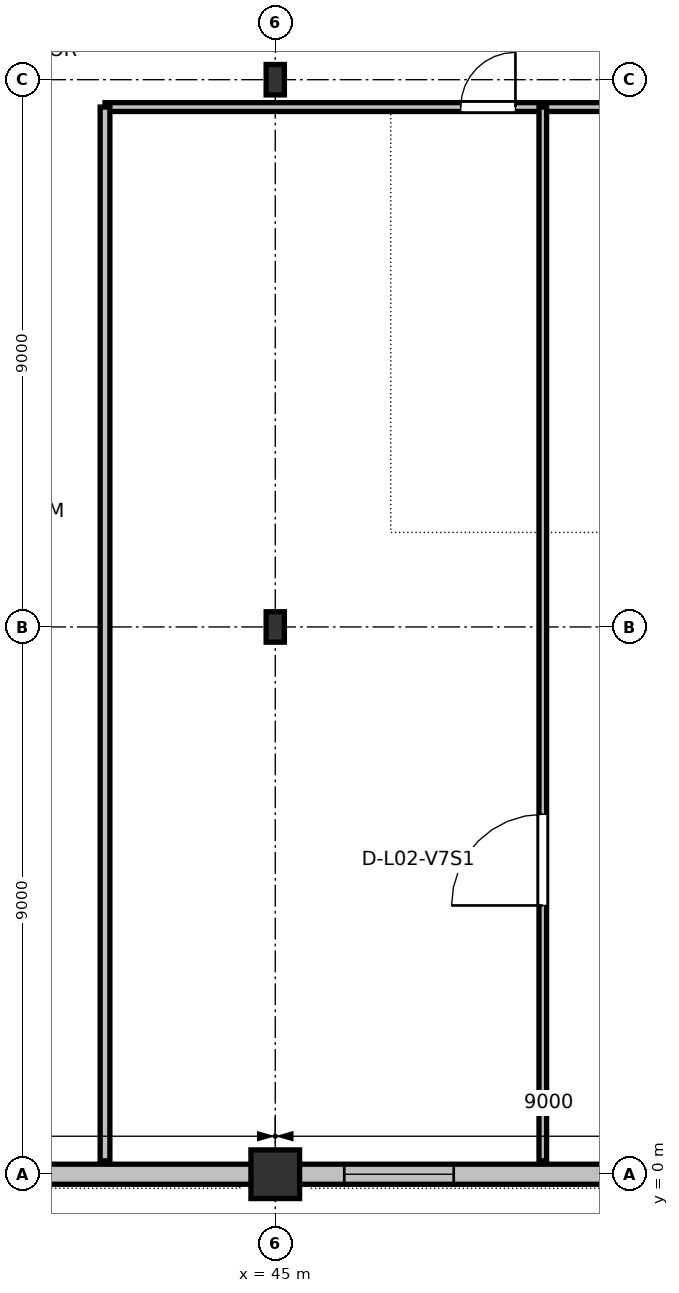
"""IFC4 building model, lengths in metres.
Left out: names, types, materials, properties, quantities, classifications, styles, units other than length and angle.
Written with IfcOpenShell. Run it as: python <this file> out.ifc"""

import sys

from ifc_helpers import new_model, si_unit, direction, frame, frame_2d, origin, origin_2d, place, context, subcontext, project, spatial, rectangle, i_section, extrude, element, fill, save


model = new_model("IFC4")
c1 = context("Model", 3, precision=1e-05, world=origin(), true_north=direction((0.0, 1.0)))
c2 = subcontext(c1, "Body", "Model", "MODEL_VIEW")
j1 = project(units=[si_unit("LENGTHUNIT", "METRE"), si_unit("PLANEANGLEUNIT", "RADIAN")], contexts=[c1])
p1 = place(None, origin())
s1 = spatial("IfcSite", under=j1, at=p1, CompositionType="ELEMENT")
p2 = place(p1, origin())
s2 = spatial("IfcBuilding", under=s1, at=p2, CompositionType="ELEMENT")
p3 = place(p2, frame((0.0, 0.0, 10.2)))
s3 = spatial("IfcBuildingStorey", under=s2, at=p3, CompositionType="ELEMENT", Elevation=10.2)
p4 = place(p3, frame((45.0, 0.0, 0.0), z_axis=(0.0, 0.0, 1.0), x_axis=(1.0, 0.0, 0.0)))
e1 = element("IfcColumn", 1, at=p4, inside=s3, PredefinedType="COLUMN", context=c2, shape_type="SweptSolid", body=[
    extrude(rectangle(XDim=0.8, YDim=0.8, at=origin_2d()), origin(), (0.0, 0.0, 1.0), 4.8),
])
for number, where, z_axis, x_axis in (
    (2, (45.0, 9.0, 0.0), (0.0, 0.0, 1.0), (1.0, 0.0, 0.0)),
    (3, (45.0, 18.0, 0.0), (0.0, 0.0, 1.0), (1.0, 0.0, 0.0)),
):
    element("IfcColumn", number, at=place(p3, frame(where, z_axis=z_axis, x_axis=x_axis)), inside=s3, PredefinedType="COLUMN", context=c2, shape_type="SweptSolid", body=[
        extrude(i_section(OverallWidth=0.3, OverallDepth=0.5, WebThickness=0.014, FlangeThickness=0.028, at=origin_2d()), origin(), (0.0, 0.0, 1.0), 4.8),
    ])
p5 = place(p3, frame((36.385, 0.0, 0.0), z_axis=(0.0, 0.0, 1.0), x_axis=(1.0, 0.0, 0.0)))
e4 = element("IfcWall", 4, at=p5, inside=s3, PredefinedType="STANDARD", context=c2, shape_type="SweptSolid", body=[
    extrude(rectangle(XDim=8.23, YDim=0.33, at=frame_2d((4.115, 0.0))), origin(), (0.0, 0.0, 1.0), 4.235),
])
p6 = place(p5, frame((0.75, 0.0, 0.9)))
e5 = element("IfcOpeningElement", 5, at=p6, cuts=e4, PredefinedType="OPENING", context=c2, shape_type="SweptSolid", body=[
    extrude(rectangle(XDim=1.0, YDim=1.35, at=frame_2d((0.5, 0.675))), frame((0.0, 0.175, 0.0), z_axis=(0.0, -1.0, 0.0), x_axis=(1.0, 0.0, 0.0)), (0.0, 0.0, 1.0), 0.35),
])
p7 = place(p3, frame((45.385, 0.0, 0.0), z_axis=(0.0, 0.0, 1.0), x_axis=(1.0, 0.0, 0.0)))
e6 = element("IfcWall", 6, at=p7, inside=s3, PredefinedType="STANDARD", context=c2, shape_type="SweptSolid", body=[
    extrude(rectangle(XDim=8.23, YDim=0.33, at=frame_2d((4.115, 0.0))), origin(), (0.0, 0.0, 1.0), 4.235),
])
p8 = place(p7, frame((0.75, 0.0, 0.9)))
e7 = element("IfcOpeningElement", 7, at=p8, cuts=e6, PredefinedType="OPENING", context=c2, shape_type="SweptSolid", body=[
    extrude(rectangle(XDim=1.8, YDim=2.1, at=frame_2d((0.9, 1.05))), frame((0.0, 0.175, 0.0), z_axis=(0.0, -1.0, 0.0), x_axis=(1.0, 0.0, 0.0)), (0.0, 0.0, 1.0), 0.35),
])
p9 = place(p3, frame((42.2, 17.55, 0.0), z_axis=(0.0, 0.0, 1.0), x_axis=(1.0, 0.0, 0.0)))
e8 = element("IfcWall", 8, at=p9, inside=s3, PredefinedType="PARTITIONING", context=c2, shape_type="SweptSolid", body=[
    extrude(rectangle(XDim=23.6, YDim=0.145, at=frame_2d((11.8, 0.0))), origin(), (0.0, 0.0, 1.0), 4.56),
])
p10 = place(p9, frame((5.85, 0.0, 0.0)))
e9 = element("IfcOpeningElement", 9, at=p10, cuts=e8, PredefinedType="OPENING", context=c2, shape_type="SweptSolid", body=[
    extrude(rectangle(XDim=0.9, YDim=2.1, at=frame_2d((0.45, 1.05))), frame((0.0, 0.083, 0.0), z_axis=(0.0, -1.0, 0.0), x_axis=(1.0, 0.0, 0.0)), (0.0, 0.0, 1.0), 0.165),
])
p11 = place(p9, frame((15.55, 0.0, 0.0)))
e10 = element("IfcOpeningElement", 10, at=p11, cuts=e8, PredefinedType="OPENING", context=c2, shape_type="SweptSolid", body=[
    extrude(rectangle(XDim=1.2, YDim=2.18, at=frame_2d((0.6, 1.09))), frame((0.0, 0.083, 0.0), z_axis=(0.0, -1.0, 0.0), x_axis=(1.0, 0.0, 0.0)), (0.0, 0.0, 1.0), 0.165),
])
p12 = place(p9, frame((17.65, 0.0, 0.0)))
e11 = element("IfcOpeningElement", 11, at=p12, cuts=e8, PredefinedType="OPENING", context=c2, shape_type="SweptSolid", body=[
    extrude(rectangle(XDim=1.3, YDim=2.18, at=frame_2d((0.65, 1.09))), frame((0.0, 0.083, 0.0), z_axis=(0.0, -1.0, 0.0), x_axis=(1.0, 0.0, 0.0)), (0.0, 0.0, 1.0), 0.165),
])
p13 = place(p3, frame((42.2, 0.22, 0.0), z_axis=(0.0, 0.0, 1.0), x_axis=(0.0, 1.0, 0.0)))
e12 = element("IfcWall", 12, at=p13, inside=s3, PredefinedType="PARTITIONING", context=c2, shape_type="SweptSolid", body=[
    extrude(rectangle(XDim=17.33, YDim=0.16, at=frame_2d((8.665, 0.0))), origin(), (0.0, 0.0, 1.0), 4.56),
])
p14 = place(p3, frame((49.4, 0.22, 0.0), z_axis=(0.0, 0.0, 1.0), x_axis=(0.0, 1.0, 0.0)))
e13 = element("IfcWall", 13, at=p14, inside=s3, PredefinedType="PARTITIONING", context=c2, shape_type="SweptSolid", body=[
    extrude(rectangle(XDim=17.33, YDim=0.125, at=frame_2d((8.665, 0.0))), origin(), (0.0, 0.0, 1.0), 4.56),
])
p15 = place(p14, frame((4.2, 0.0, 0.0)))
e14 = element("IfcOpeningElement", 14, at=p15, cuts=e13, PredefinedType="OPENING", context=c2, shape_type="SweptSolid", body=[
    extrude(rectangle(XDim=1.5, YDim=2.2, at=frame_2d((0.75, 1.1))), frame((0.0, 0.073, 0.0), z_axis=(0.0, -1.0, 0.0), x_axis=(1.0, 0.0, 0.0)), (0.0, 0.0, 1.0), 0.145),
])
p16 = place(p8, origin())
e15 = element("IfcWindow", 15, at=p16, inside=s3, PartitioningType="SINGLE_PANEL", PredefinedType="WINDOW", context=c2, shape_type="SweptSolid", body=[
    extrude(rectangle(XDim=1.8, YDim=2.1, at=frame_2d((0.9, 1.05))), frame((0.0, 0.03, 0.0), z_axis=(0.0, -1.0, 0.0), x_axis=(1.0, 0.0, 0.0)), (0.0, 0.0, 1.0), 0.06),
])
fill(e7, e15)
p17 = place(p10, origin())
e16 = element("IfcDoor", 16, at=p17, inside=s3, OperationType="SINGLE_SWING_RIGHT", PredefinedType="DOOR", context=c2, shape_type="SweptSolid", body=[
    extrude(rectangle(XDim=0.9, YDim=2.1, at=frame_2d((0.45, 1.05))), frame((0.0, 0.025, 0.0), z_axis=(0.0, -1.0, 0.0), x_axis=(1.0, 0.0, 0.0)), (0.0, 0.0, 1.0), 0.05),
])
fill(e9, e16)
p18 = place(p15, origin())
e17 = element("IfcDoor", 17, at=p18, inside=s3, OperationType="SINGLE_SWING_LEFT", PredefinedType="DOOR", context=c2, shape_type="SweptSolid", body=[
    extrude(rectangle(XDim=1.5, YDim=2.2, at=frame_2d((0.75, 1.1))), frame((0.0, 0.025, 0.0), z_axis=(0.0, -1.0, 0.0), x_axis=(1.0, 0.0, 0.0)), (0.0, 0.0, 1.0), 0.05),
])
fill(e14, e17)
save(model, sys.argv[1])
